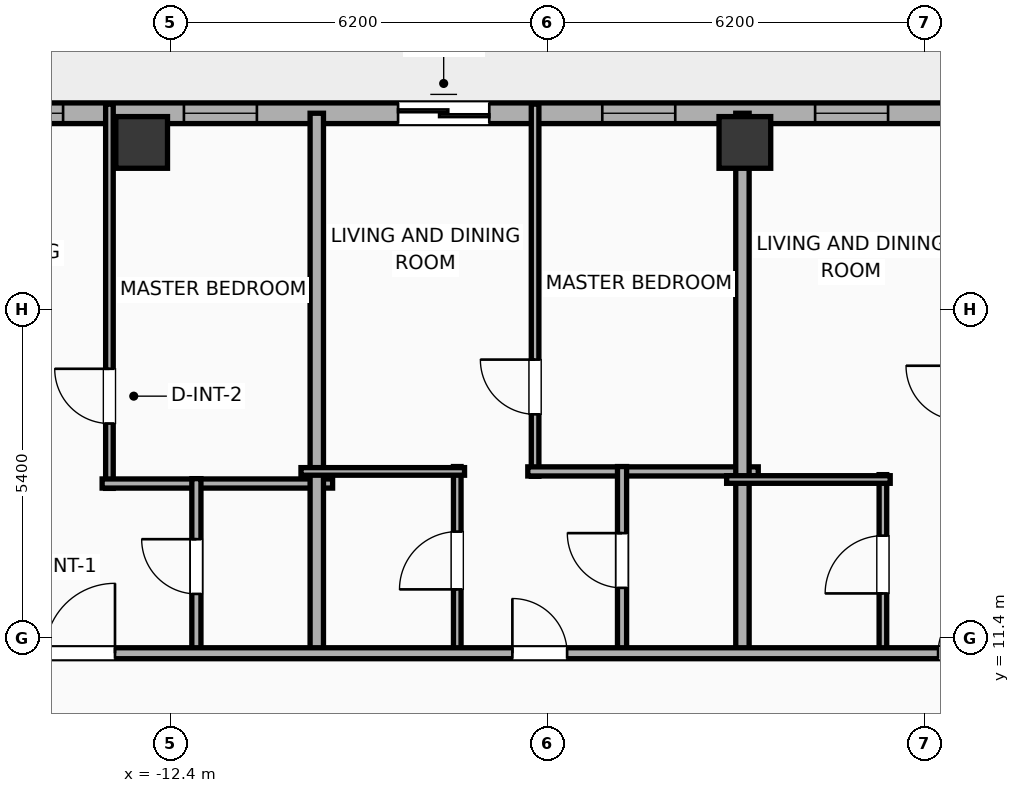
"""IFC4 building model, lengths in metres.
Left out: names, types, materials, properties, quantities, classifications, styles, units other than length and angle.
Written with IfcOpenShell. Run it as: python <this file> out.ifc"""

import sys

from ifc_helpers import new_model, si_unit, direction, frame, frame_2d, origin, origin_2d, place, context, subcontext, project, spatial, rectangle, hollow_rectangle, extrude, element, fill, save


model = new_model("IFC4")
c1 = context("Model", 3, precision=1e-05, world=origin(), true_north=direction((0.0, 1.0)))
c2 = subcontext(c1, "Body", "Model", "MODEL_VIEW")
j1 = project(units=[si_unit("LENGTHUNIT", "METRE"), si_unit("PLANEANGLEUNIT", "RADIAN")], contexts=[c1])
p1 = place(None, origin())
s1 = spatial("IfcSite", under=j1, at=p1, CompositionType="ELEMENT")
p2 = place(p1, origin())
s2 = spatial("IfcBuilding", under=s1, at=p2, CompositionType="ELEMENT")
p3 = place(p2, frame((0.0, 0.0, 231.4)))
s3 = spatial("IfcBuildingStorey", under=s2, at=p3, CompositionType="ELEMENT", Elevation=231.4)
for number, where, z_axis, x_axis in (
    (1, (-2.96, 19.55, 0.0), (0.0, 0.0, 1.0), (1.0, 0.0, 0.0)),
    (2, (-12.88, 19.55, 0.0), (0.0, 0.0, 1.0), (1.0, 0.0, 0.0)),
):
    element("IfcColumn", number, at=place(p3, frame(where, z_axis=z_axis, x_axis=x_axis)), inside=s3, PredefinedType="COLUMN", context=c2, shape_type="SweptSolid", body=[
        extrude(hollow_rectangle(XDim=0.85, YDim=0.85, WallThickness=0.028, at=origin_2d()), origin(), (0.0, 0.0, 1.0), 3.9),
    ])
p4 = place(p3, frame((-22.783, 20.03, 0.0), z_axis=(0.0, 0.0, 1.0), x_axis=(1.0, 0.0, 0.0)))
e3 = element("IfcWall", 3, at=p4, inside=s3, PredefinedType="ELEMENTEDWALL", context=c2, shape_type="SweptSolid", body=[
    extrude(rectangle(XDim=49.566, YDim=0.34, at=frame_2d((24.783, 0.0))), origin(), (0.0, 0.0, 1.0), 3.65),
])
p5 = place(p4, frame((14.12, 0.0, 0.0)))
e4 = element("IfcOpeningElement", 4, at=p5, cuts=e3, PredefinedType="OPENING", context=c2, shape_type="SweptSolid", body=[
    extrude(rectangle(XDim=1.5, YDim=2.05, at=frame_2d((0.75, 1.025))), frame((0.0, 0.18, 0.0), z_axis=(0.0, -1.0, 0.0), x_axis=(1.0, 0.0, 0.0)), (0.0, 0.0, 1.0), 0.36),
])
p6 = place(p4, frame((6.211, 0.0, 0.75)))
e5 = element("IfcOpeningElement", 5, at=p6, cuts=e3, PredefinedType="OPENING", context=c2, shape_type="SweptSolid", body=[
    extrude(rectangle(XDim=2.4, YDim=2.1, at=frame_2d((1.2, 1.05))), frame((0.0, 0.18, 0.0), z_axis=(0.0, -1.0, 0.0), x_axis=(1.0, 0.0, 0.0)), (0.0, 0.0, 1.0), 0.36),
])
p7 = place(p4, frame((23.583, 0.0, 0.75)))
e6 = element("IfcOpeningElement", 6, at=p7, cuts=e3, PredefinedType="OPENING", context=c2, shape_type="SweptSolid", body=[
    extrude(rectangle(XDim=2.4, YDim=2.1, at=frame_2d((1.2, 1.05))), frame((0.0, 0.18, 0.0), z_axis=(0.0, -1.0, 0.0), x_axis=(1.0, 0.0, 0.0)), (0.0, 0.0, 1.0), 0.36),
])
p8 = place(p4, frame((33.947, 0.0, 0.0)))
e7 = element("IfcOpeningElement", 7, at=p8, cuts=e3, PredefinedType="OPENING", context=c2, shape_type="SweptSolid", body=[
    extrude(rectangle(XDim=1.5, YDim=2.05, at=frame_2d((0.75, 1.025))), frame((0.0, 0.18, 0.0), z_axis=(0.0, -1.0, 0.0), x_axis=(1.0, 0.0, 0.0)), (0.0, 0.0, 1.0), 0.36),
])
p9 = place(p4, frame((2.36, 0.0, 0.75)))
e8 = element("IfcOpeningElement", 8, at=p9, cuts=e3, PredefinedType="OPENING", context=c2, shape_type="SweptSolid", body=[
    extrude(rectangle(XDim=1.2, YDim=2.05, at=frame_2d((0.6, 1.025))), frame((0.0, 0.18, 0.0), z_axis=(0.0, -1.0, 0.0), x_axis=(1.0, 0.0, 0.0)), (0.0, 0.0, 1.0), 0.36),
])
p10 = place(p4, frame((10.598, 0.0, 0.75)))
e9 = element("IfcOpeningElement", 9, at=p10, cuts=e3, PredefinedType="OPENING", context=c2, shape_type="SweptSolid", body=[
    extrude(rectangle(XDim=1.2, YDim=2.05, at=frame_2d((0.6, 1.025))), frame((0.0, 0.18, 0.0), z_axis=(0.0, -1.0, 0.0), x_axis=(1.0, 0.0, 0.0)), (0.0, 0.0, 1.0), 0.36),
])
p11 = place(p4, frame((17.478, 0.0, 0.75)))
e10 = element("IfcOpeningElement", 10, at=p11, cuts=e3, PredefinedType="OPENING", context=c2, shape_type="SweptSolid", body=[
    extrude(rectangle(XDim=1.2, YDim=2.05, at=frame_2d((0.6, 1.025))), frame((0.0, 0.18, 0.0), z_axis=(0.0, -1.0, 0.0), x_axis=(1.0, 0.0, 0.0)), (0.0, 0.0, 1.0), 0.36),
])
p12 = place(p4, frame((20.978, 0.0, 0.75)))
e11 = element("IfcOpeningElement", 11, at=p12, cuts=e3, PredefinedType="OPENING", context=c2, shape_type="SweptSolid", body=[
    extrude(rectangle(XDim=1.2, YDim=2.05, at=frame_2d((0.6, 1.025))), frame((0.0, 0.18, 0.0), z_axis=(0.0, -1.0, 0.0), x_axis=(1.0, 0.0, 0.0)), (0.0, 0.0, 1.0), 0.36),
])
p13 = place(p4, frame((27.758, 0.0, 0.75)))
e12 = element("IfcOpeningElement", 12, at=p13, cuts=e3, PredefinedType="OPENING", context=c2, shape_type="SweptSolid", body=[
    extrude(rectangle(XDim=1.2, YDim=2.05, at=frame_2d((0.6, 1.025))), frame((0.0, 0.18, 0.0), z_axis=(0.0, -1.0, 0.0), x_axis=(1.0, 0.0, 0.0)), (0.0, 0.0, 1.0), 0.36),
])
p14 = place(p4, frame((31.037, 0.0, 0.75)))
e13 = element("IfcOpeningElement", 13, at=p14, cuts=e3, PredefinedType="OPENING", context=c2, shape_type="SweptSolid", body=[
    extrude(rectangle(XDim=1.2, YDim=2.05, at=frame_2d((0.6, 1.025))), frame((0.0, 0.18, 0.0), z_axis=(0.0, -1.0, 0.0), x_axis=(1.0, 0.0, 0.0)), (0.0, 0.0, 1.0), 0.36),
])
p15 = place(p4, frame((37.596, 0.0, 0.75)))
e14 = element("IfcOpeningElement", 14, at=p15, cuts=e3, PredefinedType="OPENING", context=c2, shape_type="SweptSolid", body=[
    extrude(rectangle(XDim=1.2, YDim=2.05, at=frame_2d((0.6, 1.025))), frame((0.0, 0.18, 0.0), z_axis=(0.0, -1.0, 0.0), x_axis=(1.0, 0.0, 0.0)), (0.0, 0.0, 1.0), 0.36),
])
p16 = place(p4, frame((40.876, 0.0, 0.75)))
e15 = element("IfcOpeningElement", 15, at=p16, cuts=e3, PredefinedType="OPENING", context=c2, shape_type="SweptSolid", body=[
    extrude(rectangle(XDim=1.2, YDim=2.05, at=frame_2d((0.6, 1.025))), frame((0.0, 0.18, 0.0), z_axis=(0.0, -1.0, 0.0), x_axis=(1.0, 0.0, 0.0)), (0.0, 0.0, 1.0), 0.36),
])
p17 = place(p4, frame((44.156, 0.0, 0.75)))
e16 = element("IfcOpeningElement", 16, at=p17, cuts=e3, PredefinedType="OPENING", context=c2, shape_type="SweptSolid", body=[
    extrude(rectangle(XDim=1.2, YDim=2.05, at=frame_2d((0.6, 1.025))), frame((0.0, 0.18, 0.0), z_axis=(0.0, -1.0, 0.0), x_axis=(1.0, 0.0, 0.0)), (0.0, 0.0, 1.0), 0.36),
])
p18 = place(p4, frame((46.969, 0.0, 0.75)))
e17 = element("IfcOpeningElement", 17, at=p18, cuts=e3, PredefinedType="OPENING", context=c2, shape_type="SweptSolid", body=[
    extrude(rectangle(XDim=1.2, YDim=2.05, at=frame_2d((0.6, 1.025))), frame((0.0, 0.18, 0.0), z_axis=(0.0, -1.0, 0.0), x_axis=(1.0, 0.0, 0.0)), (0.0, 0.0, 1.0), 0.36),
])
p19 = place(p3, frame((-13.41, 13.861, 0.0), z_axis=(0.0, 0.0, 1.0), x_axis=(0.0, 1.0, 0.0)))
e18 = element("IfcWall", 18, at=p19, inside=s3, PredefinedType="PARTITIONING", context=c2, shape_type="SweptSolid", body=[
    extrude(rectangle(XDim=6.319, YDim=0.125, at=frame_2d((3.159, 0.0))), origin(), (0.0, 0.0, 1.0), 3.65),
])
p20 = place(p19, frame((1.067, 0.0, 0.0)))
e19 = element("IfcOpeningElement", 19, at=p20, cuts=e18, PredefinedType="OPENING", context=c2, shape_type="SweptSolid", body=[
    extrude(rectangle(XDim=0.9, YDim=2.05, at=frame_2d((0.45, 1.025))), frame((0.0, 0.073, 0.0), z_axis=(0.0, -1.0, 0.0), x_axis=(1.0, 0.0, 0.0)), (0.0, 0.0, 1.0), 0.145),
])
p21 = place(p3, frame((-13.53, 13.941, 0.0), z_axis=(0.0, 0.0, 1.0), x_axis=(1.0, 0.0, 0.0)))
e20 = element("IfcWall", 20, at=p21, inside=s3, PredefinedType="PLUMBINGWALL", context=c2, shape_type="SweptSolid", body=[
    extrude(rectangle(XDim=3.79, YDim=0.15, at=frame_2d((1.895, 0.0))), origin(), (0.0, 0.0, 1.0), 3.65),
])
p22 = place(p3, frame((-11.98, 11.13, 0.0), z_axis=(0.0, 0.0, 1.0), x_axis=(0.0, 1.0, 0.0)))
e21 = element("IfcWall", 21, at=p22, inside=s3, PredefinedType="PLUMBINGWALL", context=c2, shape_type="SweptSolid", body=[
    extrude(rectangle(XDim=2.891, YDim=0.15, at=frame_2d((1.446, 0.0))), origin(), (0.0, 0.0, 1.0), 3.65),
])
p23 = place(p22, frame((0.996, 0.0, 0.0)))
e22 = element("IfcOpeningElement", 22, at=p23, cuts=e21, PredefinedType="OPENING", context=c2, shape_type="SweptSolid", body=[
    extrude(rectangle(XDim=0.9, YDim=2.05, at=frame_2d((0.45, 1.025))), frame((0.0, 0.085, 0.0), z_axis=(0.0, -1.0, 0.0), x_axis=(1.0, 0.0, 0.0)), (0.0, 0.0, 1.0), 0.17),
])
p24 = place(p3, frame((-10.0, 11.07, 0.0), z_axis=(0.0, 0.0, 1.0), x_axis=(0.0, 1.0, 0.0)))
e23 = element("IfcWall", 23, at=p24, inside=s3, PredefinedType="PARTITIONING", context=c2, shape_type="SweptSolid", body=[
    extrude(rectangle(XDim=8.96, YDim=0.22, at=frame_2d((4.48, 0.0))), origin(), (0.0, 0.0, 1.0), 3.65),
])
p25 = place(p3, frame((-6.41, 14.06, 0.0), z_axis=(0.0, 0.0, 1.0), x_axis=(0.0, 1.0, 0.0)))
e24 = element("IfcWall", 24, at=p25, inside=s3, PredefinedType="PARTITIONING", context=c2, shape_type="SweptSolid", body=[
    extrude(rectangle(XDim=6.12, YDim=0.125, at=frame_2d((3.06, 0.0))), origin(), (0.0, 0.0, 1.0), 3.65),
])
p26 = place(p25, frame((1.019, 0.0, 0.0)))
e25 = element("IfcOpeningElement", 25, at=p26, cuts=e24, PredefinedType="OPENING", context=c2, shape_type="SweptSolid", body=[
    extrude(rectangle(XDim=0.9, YDim=2.05, at=frame_2d((0.45, 1.025))), frame((0.0, 0.073, 0.0), z_axis=(0.0, -1.0, 0.0), x_axis=(1.0, 0.0, 0.0)), (0.0, 0.0, 1.0), 0.145),
])
p27 = place(p3, frame((-6.53, 14.14, 0.0), z_axis=(0.0, 0.0, 1.0), x_axis=(1.0, 0.0, 0.0)))
e26 = element("IfcWall", 26, at=p27, inside=s3, PredefinedType="PLUMBINGWALL", context=c2, shape_type="SweptSolid", body=[
    extrude(rectangle(XDim=3.79, YDim=0.15, at=frame_2d((1.895, 0.0))), origin(), (0.0, 0.0, 1.0), 3.65),
])
p28 = place(p3, frame((-7.69, 11.13, 0.0), z_axis=(0.0, 0.0, 1.0), x_axis=(0.0, 1.0, 0.0)))
e27 = element("IfcWall", 27, at=p28, inside=s3, PredefinedType="PARTITIONING", context=c2, shape_type="SweptSolid", body=[
    extrude(rectangle(XDim=3.09, YDim=0.125, at=frame_2d((1.545, 0.0))), origin(), (0.0, 0.0, 1.0), 3.65),
])
p29 = place(p28, frame((1.07, 0.0, 0.0)))
e28 = element("IfcOpeningElement", 28, at=p29, cuts=e27, PredefinedType="OPENING", context=c2, shape_type="SweptSolid", body=[
    extrude(rectangle(XDim=0.95, YDim=2.05, at=frame_2d((0.475, 1.025))), frame((0.0, 0.073, 0.0), z_axis=(0.0, -1.0, 0.0), x_axis=(1.0, 0.0, 0.0)), (0.0, 0.0, 1.0), 0.145),
])
p30 = place(p3, frame((-10.26, 14.14, 0.0), z_axis=(0.0, 0.0, 1.0), x_axis=(1.0, 0.0, 0.0)))
e29 = element("IfcWall", 29, at=p30, inside=s3, PredefinedType="PARTITIONING", context=c2, shape_type="SweptSolid", body=[
    extrude(rectangle(XDim=2.69, YDim=0.125, at=frame_2d((1.345, 0.0))), origin(), (0.0, 0.0, 1.0), 3.65),
])
p31 = place(p3, frame((-4.98, 11.13, 0.0), z_axis=(0.0, 0.0, 1.0), x_axis=(0.0, 1.0, 0.0)))
e30 = element("IfcWall", 30, at=p31, inside=s3, PredefinedType="PLUMBINGWALL", context=c2, shape_type="SweptSolid", body=[
    extrude(rectangle(XDim=3.09, YDim=0.15, at=frame_2d((1.545, 0.0))), origin(), (0.0, 0.0, 1.0), 3.65),
])
p32 = place(p31, frame((1.095, 0.0, 0.0)))
e31 = element("IfcOpeningElement", 31, at=p32, cuts=e30, PredefinedType="OPENING", context=c2, shape_type="SweptSolid", body=[
    extrude(rectangle(XDim=0.9, YDim=2.05, at=frame_2d((0.45, 1.025))), frame((0.0, 0.085, 0.0), z_axis=(0.0, -1.0, 0.0), x_axis=(1.0, 0.0, 0.0)), (0.0, 0.0, 1.0), 0.17),
])
p33 = place(p3, frame((-3.0, 11.07, 0.0), z_axis=(0.0, 0.0, 1.0), x_axis=(0.0, 1.0, 0.0)))
e32 = element("IfcWall", 32, at=p33, inside=s3, PredefinedType="PARTITIONING", context=c2, shape_type="SweptSolid", body=[
    extrude(rectangle(XDim=8.96, YDim=0.22, at=frame_2d((4.48, 0.0))), origin(), (0.0, 0.0, 1.0), 3.09),
])
p34 = place(p3, frame((-0.69, 11.13, 0.0), z_axis=(0.0, 0.0, 1.0), x_axis=(0.0, 1.0, 0.0)))
e33 = element("IfcWall", 33, at=p34, inside=s3, PredefinedType="PARTITIONING", context=c2, shape_type="SweptSolid", body=[
    extrude(rectangle(XDim=2.957, YDim=0.125, at=frame_2d((1.479, 0.0))), origin(), (0.0, 0.0, 1.0), 3.65),
])
p35 = place(p34, frame((1.003, 0.0, 0.0)))
e34 = element("IfcOpeningElement", 34, at=p35, cuts=e33, PredefinedType="OPENING", context=c2, shape_type="SweptSolid", body=[
    extrude(rectangle(XDim=0.95, YDim=2.05, at=frame_2d((0.475, 1.025))), frame((0.0, 0.073, 0.0), z_axis=(0.0, -1.0, 0.0), x_axis=(1.0, 0.0, 0.0)), (0.0, 0.0, 1.0), 0.145),
])
p36 = place(p3, frame((-3.26, 14.007, 0.0), z_axis=(0.0, 0.0, 1.0), x_axis=(1.0, 0.0, 0.0)))
e35 = element("IfcWall", 35, at=p36, inside=s3, PredefinedType="PARTITIONING", context=c2, shape_type="SweptSolid", body=[
    extrude(rectangle(XDim=2.69, YDim=0.125, at=frame_2d((1.345, 0.0))), origin(), (0.0, 0.0, 1.0), 3.65),
])
p37 = place(p3, frame((-26.23, 11.15, 0.0), z_axis=(0.0, 0.0, 1.0), x_axis=(1.0, 0.0, 0.0)))
e36 = element("IfcWall", 36, at=p37, inside=s3, PredefinedType="PARTITIONING", context=c2, shape_type="SweptSolid", body=[
    extrude(rectangle(XDim=56.46, YDim=0.18, at=frame_2d((28.23, 0.0))), origin(), (0.0, 0.0, 1.0), 3.65),
])
p38 = place(p37, frame((3.614, 0.0, 0.0)))
e37 = element("IfcOpeningElement", 37, at=p38, cuts=e36, PredefinedType="OPENING", context=c2, shape_type="SweptSolid", body=[
    extrude(rectangle(XDim=1.15, YDim=2.05, at=frame_2d((0.575, 1.025))), frame((0.0, 0.1, 0.0), z_axis=(0.0, -1.0, 0.0), x_axis=(1.0, 0.0, 0.0)), (0.0, 0.0, 1.0), 0.2),
])
p39 = place(p37, frame((11.761, 0.0, 0.0)))
e38 = element("IfcOpeningElement", 38, at=p39, cuts=e36, PredefinedType="OPENING", context=c2, shape_type="SweptSolid", body=[
    extrude(rectangle(XDim=1.15, YDim=2.05, at=frame_2d((0.575, 1.025))), frame((0.0, 0.1, 0.0), z_axis=(0.0, -1.0, 0.0), x_axis=(1.0, 0.0, 0.0)), (0.0, 0.0, 1.0), 0.2),
])
p40 = place(p37, frame((19.447, 0.0, 0.0)))
e39 = element("IfcOpeningElement", 39, at=p40, cuts=e36, PredefinedType="OPENING", context=c2, shape_type="SweptSolid", body=[
    extrude(rectangle(XDim=0.9, YDim=2.05, at=frame_2d((0.45, 1.025))), frame((0.0, 0.1, 0.0), z_axis=(0.0, -1.0, 0.0), x_axis=(1.0, 0.0, 0.0)), (0.0, 0.0, 1.0), 0.2),
])
p41 = place(p37, frame((26.448, 0.0, 0.0)))
e40 = element("IfcOpeningElement", 40, at=p41, cuts=e36, PredefinedType="OPENING", context=c2, shape_type="SweptSolid", body=[
    extrude(rectangle(XDim=0.9, YDim=2.05, at=frame_2d((0.45, 1.025))), frame((0.0, 0.1, 0.0), z_axis=(0.0, -1.0, 0.0), x_axis=(1.0, 0.0, 0.0)), (0.0, 0.0, 1.0), 0.2),
])
p42 = place(p37, frame((33.223, 0.0, 0.0)))
e41 = element("IfcOpeningElement", 41, at=p42, cuts=e36, PredefinedType="OPENING", context=c2, shape_type="SweptSolid", body=[
    extrude(rectangle(XDim=0.9, YDim=2.05, at=frame_2d((0.45, 1.025))), frame((0.0, 0.1, 0.0), z_axis=(0.0, -1.0, 0.0), x_axis=(1.0, 0.0, 0.0)), (0.0, 0.0, 1.0), 0.2),
])
p43 = place(p37, frame((39.783, 0.0, 0.0)))
e42 = element("IfcOpeningElement", 42, at=p43, cuts=e36, PredefinedType="OPENING", context=c2, shape_type="SweptSolid", body=[
    extrude(rectangle(XDim=0.9, YDim=2.05, at=frame_2d((0.45, 1.025))), frame((0.0, 0.1, 0.0), z_axis=(0.0, -1.0, 0.0), x_axis=(1.0, 0.0, 0.0)), (0.0, 0.0, 1.0), 0.2),
])
p44 = place(p37, frame((46.344, 0.0, 0.0)))
e43 = element("IfcOpeningElement", 43, at=p44, cuts=e36, PredefinedType="OPENING", context=c2, shape_type="SweptSolid", body=[
    extrude(rectangle(XDim=0.9, YDim=2.05, at=frame_2d((0.45, 1.025))), frame((0.0, 0.1, 0.0), z_axis=(0.0, -1.0, 0.0), x_axis=(1.0, 0.0, 0.0)), (0.0, 0.0, 1.0), 0.2),
])
p45 = place(p37, frame((52.933, 0.0, 0.0)))
e44 = element("IfcOpeningElement", 44, at=p45, cuts=e36, PredefinedType="OPENING", context=c2, shape_type="SweptSolid", body=[
    extrude(rectangle(XDim=0.9, YDim=2.05, at=frame_2d((0.45, 1.025))), frame((0.0, 0.1, 0.0), z_axis=(0.0, -1.0, 0.0), x_axis=(1.0, 0.0, 0.0)), (0.0, 0.0, 1.0), 0.2),
])
p46 = place(p5, origin())
e45 = element("IfcDoor", 45, at=p46, inside=s3, OperationType="SLIDING_TO_RIGHT", PredefinedType="DOOR", context=c2, shape_type="SweptSolid", body=[
    extrude(rectangle(XDim=1.5, YDim=2.05, at=frame_2d((0.75, 1.025))), frame((0.0, 0.025, 0.0), z_axis=(0.0, -1.0, 0.0), x_axis=(1.0, 0.0, 0.0)), (0.0, 0.0, 1.0), 0.05),
])
fill(e4, e45)
p47 = place(p6, origin())
e46 = element("IfcWindow", 46, at=p47, inside=s3, PartitioningType="SINGLE_PANEL", PredefinedType="WINDOW", context=c2, shape_type="SweptSolid", body=[
    extrude(rectangle(XDim=2.4, YDim=2.1, at=frame_2d((1.2, 1.05))), frame((0.0, 0.03, 0.0), z_axis=(0.0, -1.0, 0.0), x_axis=(1.0, 0.0, 0.0)), (0.0, 0.0, 1.0), 0.06),
])
fill(e5, e46)
p48 = place(p10, origin())
e47 = element("IfcWindow", 47, at=p48, inside=s3, PartitioningType="SINGLE_PANEL", PredefinedType="WINDOW", context=c2, shape_type="SweptSolid", body=[
    extrude(rectangle(XDim=1.2, YDim=2.05, at=frame_2d((0.6, 1.025))), frame((0.0, 0.03, 0.0), z_axis=(0.0, -1.0, 0.0), x_axis=(1.0, 0.0, 0.0)), (0.0, 0.0, 1.0), 0.06),
])
fill(e9, e47)
p49 = place(p11, origin())
e48 = element("IfcWindow", 48, at=p49, inside=s3, PartitioningType="SINGLE_PANEL", PredefinedType="WINDOW", context=c2, shape_type="SweptSolid", body=[
    extrude(rectangle(XDim=1.2, YDim=2.05, at=frame_2d((0.6, 1.025))), frame((0.0, 0.03, 0.0), z_axis=(0.0, -1.0, 0.0), x_axis=(1.0, 0.0, 0.0)), (0.0, 0.0, 1.0), 0.06),
])
fill(e10, e48)
p50 = place(p12, origin())
e49 = element("IfcWindow", 49, at=p50, inside=s3, PartitioningType="SINGLE_PANEL", PredefinedType="WINDOW", context=c2, shape_type="SweptSolid", body=[
    extrude(rectangle(XDim=1.2, YDim=2.05, at=frame_2d((0.6, 1.025))), frame((0.0, 0.03, 0.0), z_axis=(0.0, -1.0, 0.0), x_axis=(1.0, 0.0, 0.0)), (0.0, 0.0, 1.0), 0.06),
])
fill(e11, e49)
p51 = place(p20, origin())
e50 = element("IfcDoor", 50, at=p51, inside=s3, OperationType="SINGLE_SWING_RIGHT", PredefinedType="DOOR", context=c2, shape_type="SweptSolid", body=[
    extrude(rectangle(XDim=0.9, YDim=2.05, at=frame_2d((0.45, 1.025))), frame((0.0, 0.025, 0.0), z_axis=(0.0, -1.0, 0.0), x_axis=(1.0, 0.0, 0.0)), (0.0, 0.0, 1.0), 0.05),
])
fill(e19, e50)
p52 = place(p23, origin())
e51 = element("IfcDoor", 51, at=p52, inside=s3, OperationType="SINGLE_SWING_RIGHT", PredefinedType="DOOR", context=c2, shape_type="SweptSolid", body=[
    extrude(rectangle(XDim=0.9, YDim=2.05, at=frame_2d((0.45, 1.025))), frame((0.0, 0.025, 0.0), z_axis=(0.0, -1.0, 0.0), x_axis=(1.0, 0.0, 0.0)), (0.0, 0.0, 1.0), 0.05),
])
fill(e22, e51)
p53 = place(p26, origin())
e52 = element("IfcDoor", 52, at=p53, inside=s3, OperationType="SINGLE_SWING_RIGHT", PredefinedType="DOOR", context=c2, shape_type="SweptSolid", body=[
    extrude(rectangle(XDim=0.9, YDim=2.05, at=frame_2d((0.45, 1.025))), frame((0.0, 0.025, 0.0), z_axis=(0.0, -1.0, 0.0), x_axis=(1.0, 0.0, 0.0)), (0.0, 0.0, 1.0), 0.05),
])
fill(e25, e52)
p54 = place(p29, origin())
e53 = element("IfcDoor", 53, at=p54, inside=s3, OperationType="SINGLE_SWING_LEFT", PredefinedType="DOOR", context=c2, shape_type="SweptSolid", body=[
    extrude(rectangle(XDim=0.95, YDim=2.05, at=frame_2d((0.475, 1.025))), frame((0.0, 0.025, 0.0), z_axis=(0.0, -1.0, 0.0), x_axis=(1.0, 0.0, 0.0)), (0.0, 0.0, 1.0), 0.05),
])
fill(e28, e53)
p55 = place(p32, origin())
e54 = element("IfcDoor", 54, at=p55, inside=s3, OperationType="SINGLE_SWING_RIGHT", PredefinedType="DOOR", context=c2, shape_type="SweptSolid", body=[
    extrude(rectangle(XDim=0.9, YDim=2.05, at=frame_2d((0.45, 1.025))), frame((0.0, 0.025, 0.0), z_axis=(0.0, -1.0, 0.0), x_axis=(1.0, 0.0, 0.0)), (0.0, 0.0, 1.0), 0.05),
])
fill(e31, e54)
p56 = place(p35, origin())
e55 = element("IfcDoor", 55, at=p56, inside=s3, OperationType="SINGLE_SWING_LEFT", PredefinedType="DOOR", context=c2, shape_type="SweptSolid", body=[
    extrude(rectangle(XDim=0.95, YDim=2.05, at=frame_2d((0.475, 1.025))), frame((0.0, 0.025, 0.0), z_axis=(0.0, -1.0, 0.0), x_axis=(1.0, 0.0, 0.0)), (0.0, 0.0, 1.0), 0.05),
])
fill(e34, e55)
p57 = place(p39, origin())
e56 = element("IfcDoor", 56, at=p57, inside=s3, OperationType="SINGLE_SWING_RIGHT", PredefinedType="DOOR", context=c2, shape_type="SweptSolid", body=[
    extrude(rectangle(XDim=1.15, YDim=2.05, at=frame_2d((0.575, 1.025))), frame((0.0, 0.025, 0.0), z_axis=(0.0, -1.0, 0.0), x_axis=(1.0, 0.0, 0.0)), (0.0, 0.0, 1.0), 0.05),
])
fill(e38, e56)
p58 = place(p40, origin())
e57 = element("IfcDoor", 57, at=p58, inside=s3, OperationType="SINGLE_SWING_LEFT", PredefinedType="DOOR", context=c2, shape_type="SweptSolid", body=[
    extrude(rectangle(XDim=0.9, YDim=2.05, at=frame_2d((0.45, 1.025))), frame((0.0, 0.025, 0.0), z_axis=(0.0, -1.0, 0.0), x_axis=(1.0, 0.0, 0.0)), (0.0, 0.0, 1.0), 0.05),
])
fill(e39, e57)
p59 = place(p41, origin())
e58 = element("IfcDoor", 58, at=p59, inside=s3, OperationType="SINGLE_SWING_RIGHT", PredefinedType="DOOR", context=c2, shape_type="SweptSolid", body=[
    extrude(rectangle(XDim=0.9, YDim=2.05, at=frame_2d((0.45, 1.025))), frame((0.0, 0.025, 0.0), z_axis=(0.0, -1.0, 0.0), x_axis=(1.0, 0.0, 0.0)), (0.0, 0.0, 1.0), 0.05),
])
fill(e40, e58)
save(model, sys.argv[1])
